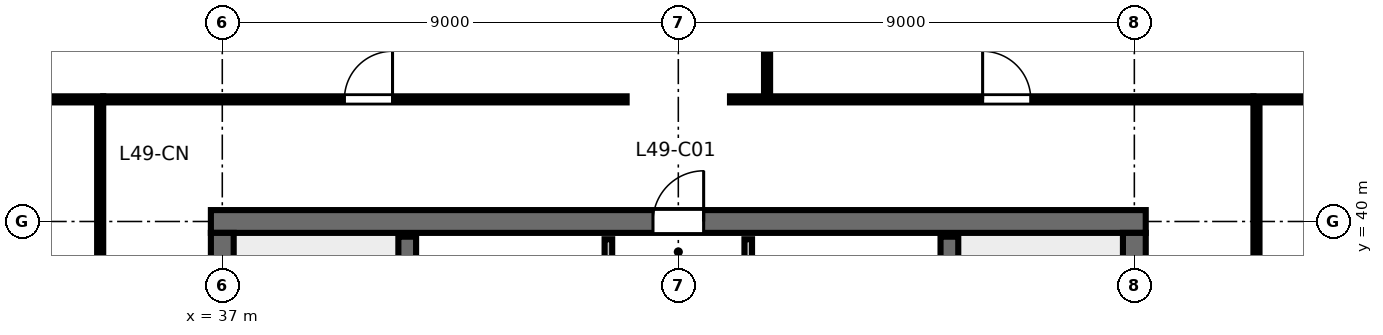
"""IFC4 building model, lengths in metres.
Left out: names, types, materials, properties, quantities, classifications, styles, units other than length and angle.
Written with IfcOpenShell. Run it as: python <this file> out.ifc"""

import sys

from ifc_helpers import new_model, si_unit, direction, frame, frame_2d, origin, place, context, subcontext, project, spatial, rectangle, extrude, element, fill, save


model = new_model("IFC4")
c1 = context("Model", 3, precision=1e-05, world=origin(), true_north=direction((0.0, 1.0)))
c2 = subcontext(c1, "Body", "Model", "MODEL_VIEW")
j1 = project(units=[si_unit("LENGTHUNIT", "METRE"), si_unit("PLANEANGLEUNIT", "RADIAN")], contexts=[c1])
p1 = place(None, origin())
s1 = spatial("IfcSite", under=j1, at=p1, CompositionType="ELEMENT")
p2 = place(p1, origin())
s2 = spatial("IfcBuilding", under=s1, at=p2, CompositionType="ELEMENT")
p3 = place(p2, frame((0.0, 0.0, 187.8)))
s3 = spatial("IfcBuildingStorey", under=s2, at=p3, CompositionType="ELEMENT", Elevation=187.8)
p4 = place(p3, frame((36.775, 40.0, 0.0), z_axis=(0.0, 0.0, 1.0), x_axis=(1.0, 0.0, 0.0)))
e1 = element("IfcWall", 1, at=p4, inside=s3, PredefinedType="SHEAR", context=c2, shape_type="SweptSolid", body=[
    extrude(rectangle(XDim=18.45, YDim=0.45, at=frame_2d((9.225, 0.0))), origin(), (0.0, 0.0, 1.0), 3.36),
])
p5 = place(p4, frame((8.725, 0.0, 0.0)))
e2 = element("IfcOpeningElement", 2, at=p5, cuts=e1, PredefinedType="OPENING", context=c2, shape_type="SweptSolid", body=[
    extrude(rectangle(XDim=1.0, YDim=2.15, at=frame_2d((0.5, 1.075))), frame((0.0, 0.235, 0.0), z_axis=(0.0, -1.0, 0.0), x_axis=(1.0, 0.0, 0.0)), (0.0, 0.0, 1.0), 0.47),
])
p6 = place(p3, frame((37.0, 24.225, 0.0), z_axis=(0.0, 0.0, 1.0), x_axis=(0.0, 1.0, 0.0)))
e3 = element("IfcWall", 3, at=p6, inside=s3, PredefinedType="SHEAR", context=c2, shape_type="SweptSolid", body=[
    extrude(rectangle(XDim=15.55, YDim=0.45, at=frame_2d((7.775, 0.0))), origin(), (0.0, 0.0, 1.0), 3.36),
])
p7 = place(p6, frame((5.3, 0.0, 0.0)))
e4 = element("IfcOpeningElement", 4, at=p7, cuts=e3, PredefinedType="OPENING", context=c2, shape_type="SweptSolid", body=[
    extrude(rectangle(XDim=1.15, YDim=2.15, at=frame_2d((0.575, 1.075))), frame((0.0, 0.235, 0.0), z_axis=(0.0, -1.0, 0.0), x_axis=(1.0, 0.0, 0.0)), (0.0, 0.0, 1.0), 0.47),
])
p8 = place(p3, frame((55.0, 24.225, 0.0), z_axis=(0.0, 0.0, 1.0), x_axis=(0.0, 1.0, 0.0)))
e5 = element("IfcWall", 5, at=p8, inside=s3, PredefinedType="SHEAR", context=c2, shape_type="SweptSolid", body=[
    extrude(rectangle(XDim=15.55, YDim=0.45, at=frame_2d((7.775, 0.0))), origin(), (0.0, 0.0, 1.0), 3.36),
])
p9 = place(p8, frame((5.3, 0.0, 0.0)))
e6 = element("IfcOpeningElement", 6, at=p9, cuts=e5, PredefinedType="OPENING", context=c2, shape_type="SweptSolid", body=[
    extrude(rectangle(XDim=1.15, YDim=2.15, at=frame_2d((0.575, 1.075))), frame((0.0, 0.235, 0.0), z_axis=(0.0, -1.0, 0.0), x_axis=(1.0, 0.0, 0.0)), (0.0, 0.0, 1.0), 0.47),
])
for number, where, z_axis, x_axis in (
    (7, (40.65, 32.0, 0.0), (0.0, 0.0, 1.0), (0.0, 1.0, 0.0)),
    (8, (51.35, 32.0, 0.0), (0.0, 0.0, 1.0), (0.0, 1.0, 0.0)),
):
    element("IfcWall", number, at=place(p3, frame(where, z_axis=z_axis, x_axis=x_axis)), inside=s3, PredefinedType="SHEAR", context=c2, shape_type="SweptSolid", body=[
        extrude(rectangle(XDim=7.7, YDim=0.35, at=frame_2d((3.85, 0.0))), origin(), (0.0, 0.0, 1.0), 3.6),
    ])
p10 = place(p3, frame((44.62, 35.72, 0.0), z_axis=(0.0, 0.0, 1.0), x_axis=(0.0, 1.0, 0.0)))
e9 = element("IfcWall", 9, at=p10, inside=s3, PredefinedType="PARTITIONING", context=c2, shape_type="SweptSolid", body=[
    extrude(rectangle(XDim=3.93, YDim=0.15, at=frame_2d((1.965, 0.0))), origin(), (0.0, 0.0, 1.0), 3.375),
])
p11 = place(p10, frame((1.5, 0.0, 0.0)))
e10 = element("IfcOpeningElement", 10, at=p11, cuts=e9, PredefinedType="OPENING", context=c2, shape_type="SweptSolid", body=[
    extrude(rectangle(XDim=0.9, YDim=2.15, at=frame_2d((0.45, 1.075))), frame((0.0, 0.085, 0.0), z_axis=(0.0, -1.0, 0.0), x_axis=(1.0, 0.0, 0.0)), (0.0, 0.0, 1.0), 0.17),
])
p12 = place(p3, frame((47.38, 35.72, 0.0), z_axis=(0.0, 0.0, 1.0), x_axis=(0.0, 1.0, 0.0)))
e11 = element("IfcWall", 11, at=p12, inside=s3, PredefinedType="PARTITIONING", context=c2, shape_type="SweptSolid", body=[
    extrude(rectangle(XDim=3.93, YDim=0.15, at=frame_2d((1.965, 0.0))), origin(), (0.0, 0.0, 1.0), 3.375),
])
p13 = place(p12, frame((1.5, 0.0, 0.0)))
e12 = element("IfcOpeningElement", 12, at=p13, cuts=e11, PredefinedType="OPENING", context=c2, shape_type="SweptSolid", body=[
    extrude(rectangle(XDim=0.9, YDim=2.15, at=frame_2d((0.45, 1.075))), frame((0.0, 0.085, 0.0), z_axis=(0.0, -1.0, 0.0), x_axis=(1.0, 0.0, 0.0)), (0.0, 0.0, 1.0), 0.17),
])
p14 = place(p3, frame((47.751, 42.41, 0.0), z_axis=(0.0, 0.0, 1.0), x_axis=(0.0, 1.0, 0.0)))
e13 = element("IfcWall", 13, at=p14, inside=s3, PredefinedType="PARTITIONING", context=c2, shape_type="SweptSolid", body=[
    extrude(rectangle(XDim=8.67, YDim=0.12, at=frame_2d((4.335, 0.0))), origin(), (0.0, 0.0, 1.0), 2.655),
])
p15 = place(p14, frame((1.4, 0.0, 0.0)))
e14 = element("IfcOpeningElement", 14, at=p15, cuts=e13, PredefinedType="OPENING", context=c2, shape_type="SweptSolid", body=[
    extrude(rectangle(XDim=0.9, YDim=2.15, at=frame_2d((0.45, 1.075))), frame((0.0, 0.07, 0.0), z_axis=(0.0, -1.0, 0.0), x_axis=(1.0, 0.0, 0.0)), (0.0, 0.0, 1.0), 0.14),
])
p16 = place(p3, frame((34.65, 42.41, 0.0), z_axis=(0.0, 0.0, 1.0), x_axis=(1.0, 0.0, 0.0)))
e15 = element("IfcWall", 15, at=p16, inside=s3, PredefinedType="PARTITIONING", context=c2, shape_type="SweptSolid", body=[
    extrude(rectangle(XDim=10.33, YDim=0.12, at=frame_2d((5.165, 0.0))), origin(), (0.0, 0.0, 1.0), 2.655),
])
p17 = place(p16, frame((4.76, 0.0, 0.0)))
e16 = element("IfcOpeningElement", 16, at=p17, cuts=e15, PredefinedType="OPENING", context=c2, shape_type="SweptSolid", body=[
    extrude(rectangle(XDim=0.95, YDim=2.15, at=frame_2d((0.475, 1.075))), frame((0.0, 0.07, 0.0), z_axis=(0.0, -1.0, 0.0), x_axis=(1.0, 0.0, 0.0)), (0.0, 0.0, 1.0), 0.14),
])
p18 = place(p3, frame((47.02, 42.41, 0.0), z_axis=(0.0, 0.0, 1.0), x_axis=(1.0, 0.0, 0.0)))
e17 = element("IfcWall", 17, at=p18, inside=s3, PredefinedType="PARTITIONING", context=c2, shape_type="SweptSolid", body=[
    extrude(rectangle(XDim=10.33, YDim=0.12, at=frame_2d((5.165, 0.0))), origin(), (0.0, 0.0, 1.0), 2.655),
])
p19 = place(p18, frame((4.986, 0.0, 0.0)))
e18 = element("IfcOpeningElement", 18, at=p19, cuts=e17, PredefinedType="OPENING", context=c2, shape_type="SweptSolid", body=[
    extrude(rectangle(XDim=0.95, YDim=2.15, at=frame_2d((0.475, 1.075))), frame((0.0, 0.07, 0.0), z_axis=(0.0, -1.0, 0.0), x_axis=(1.0, 0.0, 0.0)), (0.0, 0.0, 1.0), 0.14),
])
p20 = place(p3, frame((34.59, 21.65, 0.0), z_axis=(0.0, 0.0, 1.0), x_axis=(0.0, 1.0, 0.0)))
e19 = element("IfcWall", 19, at=p20, inside=s3, PredefinedType="PARTITIONING", context=c2, shape_type="SweptSolid", body=[
    extrude(rectangle(XDim=20.7, YDim=0.12, at=frame_2d((10.35, 0.0))), origin(), (0.0, 0.0, 1.0), 2.655),
])
p21 = place(p20, frame((6.214, 0.0, 0.0)))
e20 = element("IfcOpeningElement", 20, at=p21, cuts=e19, PredefinedType="OPENING", context=c2, shape_type="SweptSolid", body=[
    extrude(rectangle(XDim=0.95, YDim=2.15, at=frame_2d((0.475, 1.075))), frame((0.0, 0.07, 0.0), z_axis=(0.0, -1.0, 0.0), x_axis=(1.0, 0.0, 0.0)), (0.0, 0.0, 1.0), 0.14),
])
p22 = place(p20, frame((16.365, 0.0, 0.0)))
e21 = element("IfcOpeningElement", 21, at=p22, cuts=e19, PredefinedType="OPENING", context=c2, shape_type="SweptSolid", body=[
    extrude(rectangle(XDim=0.95, YDim=2.15, at=frame_2d((0.475, 1.075))), frame((0.0, 0.07, 0.0), z_axis=(0.0, -1.0, 0.0), x_axis=(1.0, 0.0, 0.0)), (0.0, 0.0, 1.0), 0.14),
])
p23 = place(p3, frame((57.41, 21.65, 0.0), z_axis=(0.0, 0.0, 1.0), x_axis=(0.0, 1.0, 0.0)))
e22 = element("IfcWall", 22, at=p23, inside=s3, PredefinedType="PARTITIONING", context=c2, shape_type="SweptSolid", body=[
    extrude(rectangle(XDim=20.7, YDim=0.12, at=frame_2d((10.35, 0.0))), origin(), (0.0, 0.0, 1.0), 2.655),
])
p24 = place(p23, frame((9.875, 0.0, 0.0)))
e23 = element("IfcOpeningElement", 23, at=p24, cuts=e22, PredefinedType="OPENING", context=c2, shape_type="SweptSolid", body=[
    extrude(rectangle(XDim=0.95, YDim=2.15, at=frame_2d((0.475, 1.075))), frame((0.0, 0.07, 0.0), z_axis=(0.0, -1.0, 0.0), x_axis=(1.0, 0.0, 0.0)), (0.0, 0.0, 1.0), 0.14),
])
for number, where, z_axis, x_axis in (
    (24, (34.65, 42.41, 0.0), (0.0, 0.0, 1.0), (-1.0, 0.0, 0.0)),
    (25, (57.35, 42.41, 0.0), (0.0, 0.0, 1.0), (1.0, 0.0, 0.0)),
):
    element("IfcWall", number, at=place(p3, frame(where, z_axis=z_axis, x_axis=x_axis)), inside=s3, PredefinedType="PARTITIONING", context=c2, shape_type="SweptSolid", body=[
        extrude(rectangle(XDim=10.25, YDim=0.12, at=frame_2d((5.125, 0.0))), origin(), (0.0, 0.0, 1.0), 2.655),
    ])
p25 = place(p5, origin())
e26 = element("IfcDoor", 26, at=p25, inside=s3, OperationType="SINGLE_SWING_RIGHT", PredefinedType="DOOR", context=c2, shape_type="SweptSolid", body=[
    extrude(rectangle(XDim=1.0, YDim=2.15, at=frame_2d((0.5, 1.075))), frame((0.0, 0.025, 0.0), z_axis=(0.0, -1.0, 0.0), x_axis=(1.0, 0.0, 0.0)), (0.0, 0.0, 1.0), 0.05),
])
fill(e2, e26)
p26 = place(p17, origin())
e27 = element("IfcDoor", 27, at=p26, inside=s3, OperationType="SINGLE_SWING_RIGHT", PredefinedType="DOOR", context=c2, shape_type="SweptSolid", body=[
    extrude(rectangle(XDim=0.95, YDim=2.15, at=frame_2d((0.475, 1.075))), frame((0.0, 0.025, 0.0), z_axis=(0.0, -1.0, 0.0), x_axis=(1.0, 0.0, 0.0)), (0.0, 0.0, 1.0), 0.05),
])
fill(e16, e27)
p27 = place(p19, origin())
e28 = element("IfcDoor", 28, at=p27, inside=s3, OperationType="SINGLE_SWING_LEFT", PredefinedType="DOOR", context=c2, shape_type="SweptSolid", body=[
    extrude(rectangle(XDim=0.95, YDim=2.15, at=frame_2d((0.475, 1.075))), frame((0.0, 0.025, 0.0), z_axis=(0.0, -1.0, 0.0), x_axis=(1.0, 0.0, 0.0)), (0.0, 0.0, 1.0), 0.05),
])
fill(e18, e28)
save(model, sys.argv[1])
